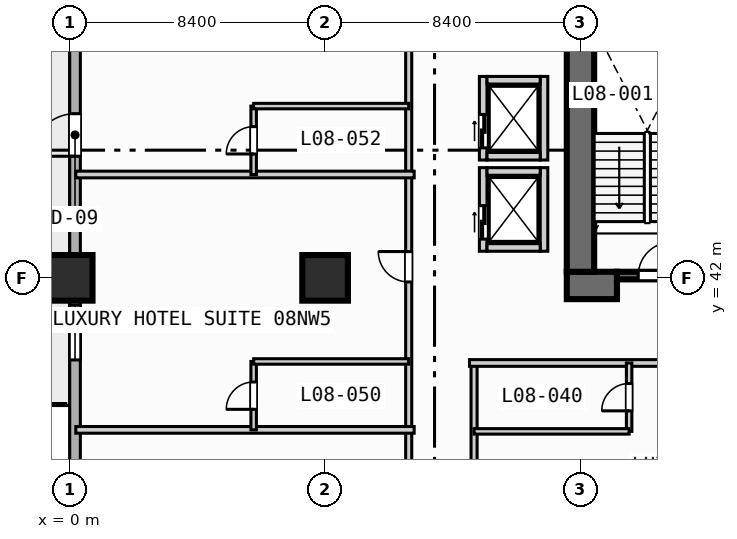
"""IFC4 building model, lengths in metres.
Left out: names, types, materials, properties, quantities, classifications, styles, units other than length and angle.
Written with IfcOpenShell. Run it as: python <this file> out.ifc"""

import sys

from ifc_helpers import new_model, si_unit, direction, frame, frame_2d, origin, origin_2d, place, context, subcontext, project, spatial, rectangle, extrude, element, fill, save


model = new_model("IFC4")
c1 = context("Model", 3, precision=1e-05, world=origin(), true_north=direction((0.0, 1.0)))
c2 = subcontext(c1, "Body", "Model", "MODEL_VIEW")
j1 = project(units=[si_unit("LENGTHUNIT", "METRE"), si_unit("PLANEANGLEUNIT", "RADIAN")], contexts=[c1])
p1 = place(None, origin())
s1 = spatial("IfcSite", under=j1, at=p1, CompositionType="ELEMENT")
p2 = place(p1, origin())
s2 = spatial("IfcBuilding", under=s1, at=p2, CompositionType="ELEMENT")
p3 = place(p2, frame((0.0, 0.0, 39.6)))
s3 = spatial("IfcBuildingStorey", under=s2, at=p3, CompositionType="ELEMENT", Elevation=39.6)
p4 = place(p3, frame((16.35, 41.75, 0.0), z_axis=(0.0, 0.0, 1.0), x_axis=(1.0, 0.0, 0.0)))
e1 = element("IfcWall", 1, at=p4, inside=s3, PredefinedType="SHEAR", context=c2, shape_type="SweptSolid", body=[
    extrude(rectangle(XDim=1.65, YDim=0.9, at=frame_2d((0.825, 0.0))), origin(), (0.0, 0.0, 1.0), 3.55),
])
p5 = place(p3, frame((16.8, 42.2, 0.0), z_axis=(0.0, 0.0, 1.0), x_axis=(0.0, 1.0, 0.0)))
e2 = element("IfcWall", 2, at=p5, inside=s3, PredefinedType="SHEAR", context=c2, shape_type="SweptSolid", body=[
    extrude(rectangle(XDim=16.35, YDim=0.9, at=frame_2d((8.175, 0.0))), origin(), (0.0, 0.0, 1.0), 3.55),
])
for number, where, z_axis, x_axis in (
    (3, (0.0, 42.0, 0.0), (0.0, 0.0, 1.0), (1.0, 0.0, 0.0)),
    (4, (8.4, 42.0, 0.0), (0.0, 0.0, 1.0), (1.0, 0.0, 0.0)),
):
    element("IfcColumn", number, at=place(p3, frame(where, z_axis=z_axis, x_axis=x_axis)), inside=s3, PredefinedType="COLUMN", context=c2, shape_type="SweptSolid", body=[
        extrude(rectangle(XDim=1.5, YDim=1.5, at=origin_2d()), origin(), (0.0, 0.0, 1.0), 3.8),
    ])
p6 = place(p3, frame((0.175, 3.175, 0.0), z_axis=(0.0, 0.0, 1.0), x_axis=(0.0, 1.0, 0.0)))
e5 = element("IfcWall", 5, at=p6, inside=s3, PredefinedType="STANDARD", context=c2, shape_type="SweptSolid", body=[
    extrude(rectangle(XDim=86.05, YDim=0.35, at=frame_2d((43.025, 0.0))), origin(), (0.0, 0.0, 1.0), 3.55),
])
p7 = place(p6, frame((42.825, 0.0, 0.0)))
e6 = element("IfcOpeningElement", 6, at=p7, cuts=e5, PredefinedType="OPENING", context=c2, shape_type="SweptSolid", body=[
    extrude(rectangle(XDim=1.4, YDim=2.2, at=frame_2d((0.7, 1.1))), frame((0.0, 0.185, 0.0), z_axis=(0.0, -1.0, 0.0), x_axis=(1.0, 0.0, 0.0)), (0.0, 0.0, 1.0), 0.37),
])
p8 = place(p6, frame((2.525, 0.0, 0.85)))
e7 = element("IfcOpeningElement", 7, at=p8, cuts=e5, PredefinedType="OPENING", context=c2, shape_type="SweptSolid", body=[
    extrude(rectangle(XDim=1.8, YDim=1.8, at=frame_2d((0.9, 0.9))), frame((0.0, 0.185, 0.0), z_axis=(0.0, -1.0, 0.0), x_axis=(1.0, 0.0, 0.0)), (0.0, 0.0, 1.0), 0.37),
])
p9 = place(p6, frame((10.925, 0.0, 0.85)))
e8 = element("IfcOpeningElement", 8, at=p9, cuts=e5, PredefinedType="OPENING", context=c2, shape_type="SweptSolid", body=[
    extrude(rectangle(XDim=1.8, YDim=1.8, at=frame_2d((0.9, 0.9))), frame((0.0, 0.185, 0.0), z_axis=(0.0, -1.0, 0.0), x_axis=(1.0, 0.0, 0.0)), (0.0, 0.0, 1.0), 0.37),
])
p10 = place(p6, frame((19.325, 0.0, 0.85)))
e9 = element("IfcOpeningElement", 9, at=p10, cuts=e5, PredefinedType="OPENING", context=c2, shape_type="SweptSolid", body=[
    extrude(rectangle(XDim=1.8, YDim=1.8, at=frame_2d((0.9, 0.9))), frame((0.0, 0.185, 0.0), z_axis=(0.0, -1.0, 0.0), x_axis=(1.0, 0.0, 0.0)), (0.0, 0.0, 1.0), 0.37),
])
p11 = place(p6, frame((27.725, 0.0, 0.85)))
e10 = element("IfcOpeningElement", 10, at=p11, cuts=e5, PredefinedType="OPENING", context=c2, shape_type="SweptSolid", body=[
    extrude(rectangle(XDim=1.8, YDim=1.8, at=frame_2d((0.9, 0.9))), frame((0.0, 0.185, 0.0), z_axis=(0.0, -1.0, 0.0), x_axis=(1.0, 0.0, 0.0)), (0.0, 0.0, 1.0), 0.37),
])
p12 = place(p6, frame((36.125, 0.0, 0.85)))
e11 = element("IfcOpeningElement", 11, at=p12, cuts=e5, PredefinedType="OPENING", context=c2, shape_type="SweptSolid", body=[
    extrude(rectangle(XDim=1.8, YDim=1.8, at=frame_2d((0.9, 0.9))), frame((0.0, 0.185, 0.0), z_axis=(0.0, -1.0, 0.0), x_axis=(1.0, 0.0, 0.0)), (0.0, 0.0, 1.0), 0.37),
])
p13 = place(p6, frame((52.925, 0.0, 0.85)))
e12 = element("IfcOpeningElement", 12, at=p13, cuts=e5, PredefinedType="OPENING", context=c2, shape_type="SweptSolid", body=[
    extrude(rectangle(XDim=1.8, YDim=1.8, at=frame_2d((0.9, 0.9))), frame((0.0, 0.185, 0.0), z_axis=(0.0, -1.0, 0.0), x_axis=(1.0, 0.0, 0.0)), (0.0, 0.0, 1.0), 0.37),
])
p14 = place(p6, frame((61.325, 0.0, 0.85)))
e13 = element("IfcOpeningElement", 13, at=p14, cuts=e5, PredefinedType="OPENING", context=c2, shape_type="SweptSolid", body=[
    extrude(rectangle(XDim=1.8, YDim=1.8, at=frame_2d((0.9, 0.9))), frame((0.0, 0.185, 0.0), z_axis=(0.0, -1.0, 0.0), x_axis=(1.0, 0.0, 0.0)), (0.0, 0.0, 1.0), 0.37),
])
p15 = place(p6, frame((69.725, 0.0, 0.85)))
e14 = element("IfcOpeningElement", 14, at=p15, cuts=e5, PredefinedType="OPENING", context=c2, shape_type="SweptSolid", body=[
    extrude(rectangle(XDim=1.8, YDim=1.8, at=frame_2d((0.9, 0.9))), frame((0.0, 0.185, 0.0), z_axis=(0.0, -1.0, 0.0), x_axis=(1.0, 0.0, 0.0)), (0.0, 0.0, 1.0), 0.37),
])
p16 = place(p6, frame((78.075, 0.0, 0.85)))
e15 = element("IfcOpeningElement", 15, at=p16, cuts=e5, PredefinedType="OPENING", context=c2, shape_type="SweptSolid", body=[
    extrude(rectangle(XDim=1.8, YDim=1.8, at=frame_2d((0.9, 0.9))), frame((0.0, 0.185, 0.0), z_axis=(0.0, -1.0, 0.0), x_axis=(1.0, 0.0, 0.0)), (0.0, 0.0, 1.0), 0.37),
])
p17 = place(p3, frame((18.0, 42.075, 0.0), z_axis=(0.0, 0.0, 1.0), x_axis=(1.0, 0.0, 0.0)))
e16 = element("IfcWall", 16, at=p17, inside=s3, PredefinedType="SOLIDWALL", context=c2, shape_type="SweptSolid", body=[
    extrude(rectangle(XDim=2.5, YDim=0.25, at=frame_2d((1.25, 0.0))), origin(), (0.0, 0.0, 1.0), 3.55),
])
p18 = place(p17, frame((0.7, 0.0, 0.0)))
e17 = element("IfcOpeningElement", 17, at=p18, cuts=e16, PredefinedType="OPENING", context=c2, shape_type="SweptSolid", body=[
    extrude(rectangle(XDim=1.1, YDim=2.15, at=frame_2d((0.55, 1.075))), frame((0.0, 0.135, 0.0), z_axis=(0.0, -1.0, 0.0), x_axis=(1.0, 0.0, 0.0)), (0.0, 0.0, 1.0), 0.27),
])
p19 = place(p3, frame((13.6, 42.875, 0.0), z_axis=(0.0, 0.0, 1.0), x_axis=(0.0, 1.0, 0.0)))
e18 = element("IfcWall", 18, at=p19, inside=s3, PredefinedType="SOLIDWALL", context=c2, shape_type="SweptSolid", body=[
    extrude(rectangle(XDim=2.75, YDim=0.25, at=frame_2d((1.375, 0.0))), origin(), (0.0, 0.0, 1.0), 3.55),
])
p20 = place(p19, frame((0.4, 0.0, 0.0)))
e19 = element("IfcOpeningElement", 19, at=p20, cuts=e18, PredefinedType="OPENING", context=c2, shape_type="SweptSolid", body=[
    extrude(rectangle(XDim=1.1, YDim=2.15, at=frame_2d((0.55, 1.075))), frame((0.0, 0.135, 0.0), z_axis=(0.0, -1.0, 0.0), x_axis=(1.0, 0.0, 0.0)), (0.0, 0.0, 1.0), 0.27),
])
p21 = place(p3, frame((15.6, 42.875, 0.0), z_axis=(0.0, 0.0, 1.0), x_axis=(0.0, 1.0, 0.0)))
e20 = element("IfcWall", 20, at=p21, inside=s3, PredefinedType="SOLIDWALL", context=c2, shape_type="SweptSolid", body=[
    extrude(rectangle(XDim=2.75, YDim=0.25, at=frame_2d((1.375, 0.0))), origin(), (0.0, 0.0, 1.0), 3.55),
])
for number, where, z_axis, x_axis in (
    (21, (13.725, 43.0, 0.0), (0.0, 0.0, 1.0), (1.0, 0.0, 0.0)),
    (22, (13.725, 45.5, 0.0), (0.0, 0.0, 1.0), (1.0, 0.0, 0.0)),
):
    element("IfcWall", number, at=place(p3, frame(where, z_axis=z_axis, x_axis=x_axis)), inside=s3, PredefinedType="SOLIDWALL", context=c2, shape_type="SweptSolid", body=[
        extrude(rectangle(XDim=1.75, YDim=0.25, at=frame_2d((0.875, 0.0))), origin(), (0.0, 0.0, 1.0), 3.55),
    ])
p22 = place(p3, frame((13.6, 45.875, 0.0), z_axis=(0.0, 0.0, 1.0), x_axis=(0.0, 1.0, 0.0)))
e23 = element("IfcWall", 23, at=p22, inside=s3, PredefinedType="SOLIDWALL", context=c2, shape_type="SweptSolid", body=[
    extrude(rectangle(XDim=2.75, YDim=0.25, at=frame_2d((1.375, 0.0))), origin(), (0.0, 0.0, 1.0), 3.55),
])
p23 = place(p22, frame((0.4, 0.0, 0.0)))
e24 = element("IfcOpeningElement", 24, at=p23, cuts=e23, PredefinedType="OPENING", context=c2, shape_type="SweptSolid", body=[
    extrude(rectangle(XDim=1.1, YDim=2.15, at=frame_2d((0.55, 1.075))), frame((0.0, 0.135, 0.0), z_axis=(0.0, -1.0, 0.0), x_axis=(1.0, 0.0, 0.0)), (0.0, 0.0, 1.0), 0.27),
])
p24 = place(p3, frame((15.6, 45.875, 0.0), z_axis=(0.0, 0.0, 1.0), x_axis=(0.0, 1.0, 0.0)))
e25 = element("IfcWall", 25, at=p24, inside=s3, PredefinedType="SOLIDWALL", context=c2, shape_type="SweptSolid", body=[
    extrude(rectangle(XDim=2.75, YDim=0.25, at=frame_2d((1.375, 0.0))), origin(), (0.0, 0.0, 1.0), 3.55),
])
for number, where, z_axis, x_axis in (
    (26, (13.725, 46.0, 0.0), (0.0, 0.0, 1.0), (1.0, 0.0, 0.0)),
    (27, (13.725, 48.5, 0.0), (0.0, 0.0, 1.0), (1.0, 0.0, 0.0)),
):
    element("IfcWall", number, at=place(p3, frame(where, z_axis=z_axis, x_axis=x_axis)), inside=s3, PredefinedType="SOLIDWALL", context=c2, shape_type="SweptSolid", body=[
        extrude(rectangle(XDim=1.75, YDim=0.25, at=frame_2d((0.875, 0.0))), origin(), (0.0, 0.0, 1.0), 3.55),
    ])
p25 = place(p3, frame((13.3, 25.6, 0.0), z_axis=(0.0, 0.0, 1.0), x_axis=(0.0, 1.0, 0.0)))
e28 = element("IfcWall", 28, at=p25, inside=s3, PredefinedType="PARTITIONING", context=c2, shape_type="SweptSolid", body=[
    extrude(rectangle(XDim=13.6, YDim=0.2, at=frame_2d((6.8, 0.0))), origin(), (0.0, 0.0, 1.0), 3.55),
])
p26 = place(p25, frame((1.735, 0.0, 0.0)))
e29 = element("IfcOpeningElement", 29, at=p26, cuts=e28, PredefinedType="OPENING", context=c2, shape_type="SweptSolid", body=[
    extrude(rectangle(XDim=1.0, YDim=2.15, at=frame_2d((0.5, 1.075))), frame((0.0, 0.11, 0.0), z_axis=(0.0, -1.0, 0.0), x_axis=(1.0, 0.0, 0.0)), (0.0, 0.0, 1.0), 0.22),
])
p27 = place(p25, frame((8.535, 0.0, 0.0)))
e30 = element("IfcOpeningElement", 30, at=p27, cuts=e28, PredefinedType="OPENING", context=c2, shape_type="SweptSolid", body=[
    extrude(rectangle(XDim=1.0, YDim=2.15, at=frame_2d((0.5, 1.075))), frame((0.0, 0.11, 0.0), z_axis=(0.0, -1.0, 0.0), x_axis=(1.0, 0.0, 0.0)), (0.0, 0.0, 1.0), 0.22),
])
p28 = place(p3, frame((13.15, 39.2, 0.0), z_axis=(0.0, 0.0, 1.0), x_axis=(1.0, 0.0, 0.0)))
e31 = element("IfcWall", 31, at=p28, inside=s3, PredefinedType="PARTITIONING", context=c2, shape_type="SweptSolid", body=[
    extrude(rectangle(XDim=20.28, YDim=0.22, at=frame_2d((10.14, 0.0))), origin(), (0.0, 0.0, 1.0), 3.55),
])
p29 = place(p3, frame((18.4, 36.95, 0.0), z_axis=(0.0, 0.0, 1.0), x_axis=(0.0, 1.0, 0.0)))
e32 = element("IfcWall", 32, at=p29, inside=s3, PredefinedType="PLUMBINGWALL", context=c2, shape_type="SweptSolid", body=[
    extrude(rectangle(XDim=2.25, YDim=0.18, at=frame_2d((1.125, 0.0))), origin(), (0.0, 0.0, 1.0), 3.55),
])
p30 = place(p29, frame((0.675, 0.0, 0.0)))
e33 = element("IfcOpeningElement", 33, at=p30, cuts=e32, PredefinedType="OPENING", context=c2, shape_type="SweptSolid", body=[
    extrude(rectangle(XDim=0.9, YDim=2.1, at=frame_2d((0.45, 1.05))), frame((0.0, 0.1, 0.0), z_axis=(0.0, -1.0, 0.0), x_axis=(1.0, 0.0, 0.0)), (0.0, 0.0, 1.0), 0.2),
])
p31 = place(p3, frame((13.3, 36.95, 0.0), z_axis=(0.0, 0.0, 1.0), x_axis=(1.0, 0.0, 0.0)))
e34 = element("IfcWall", 34, at=p31, inside=s3, PredefinedType="PLUMBINGWALL", context=c2, shape_type="SweptSolid", body=[
    extrude(rectangle(XDim=5.1, YDim=0.18, at=frame_2d((2.55, 0.0))), origin(), (0.0, 0.0, 1.0), 3.55),
])
p32 = place(p3, frame((11.15, 3.4, 0.0), z_axis=(0.0, 0.0, 1.0), x_axis=(0.0, 1.0, 0.0)))
e35 = element("IfcWall", 35, at=p32, inside=s3, PredefinedType="PARTITIONING", context=c2, shape_type="SweptSolid", body=[
    extrude(rectangle(XDim=85.4, YDim=0.2, at=frame_2d((42.7, 0.0))), origin(), (0.0, 0.0, 1.0), 3.55),
])
p33 = place(p32, frame((4.865, 0.0, 0.0)))
e36 = element("IfcOpeningElement", 36, at=p33, cuts=e35, PredefinedType="OPENING", context=c2, shape_type="SweptSolid", body=[
    extrude(rectangle(XDim=1.0, YDim=2.15, at=frame_2d((0.5, 1.075))), frame((0.0, 0.11, 0.0), z_axis=(0.0, -1.0, 0.0), x_axis=(1.0, 0.0, 0.0)), (0.0, 0.0, 1.0), 0.22),
])
p34 = place(p32, frame((13.265, 0.0, 0.0)))
e37 = element("IfcOpeningElement", 37, at=p34, cuts=e35, PredefinedType="OPENING", context=c2, shape_type="SweptSolid", body=[
    extrude(rectangle(XDim=1.0, YDim=2.15, at=frame_2d((0.5, 1.075))), frame((0.0, 0.11, 0.0), z_axis=(0.0, -1.0, 0.0), x_axis=(1.0, 0.0, 0.0)), (0.0, 0.0, 1.0), 0.22),
])
p35 = place(p32, frame((21.665, 0.0, 0.0)))
e38 = element("IfcOpeningElement", 38, at=p35, cuts=e35, PredefinedType="OPENING", context=c2, shape_type="SweptSolid", body=[
    extrude(rectangle(XDim=1.0, YDim=2.15, at=frame_2d((0.5, 1.075))), frame((0.0, 0.11, 0.0), z_axis=(0.0, -1.0, 0.0), x_axis=(1.0, 0.0, 0.0)), (0.0, 0.0, 1.0), 0.22),
])
p36 = place(p32, frame((30.065, 0.0, 0.0)))
e39 = element("IfcOpeningElement", 39, at=p36, cuts=e35, PredefinedType="OPENING", context=c2, shape_type="SweptSolid", body=[
    extrude(rectangle(XDim=1.0, YDim=2.15, at=frame_2d((0.5, 1.075))), frame((0.0, 0.11, 0.0), z_axis=(0.0, -1.0, 0.0), x_axis=(1.0, 0.0, 0.0)), (0.0, 0.0, 1.0), 0.22),
])
p37 = place(p32, frame((38.465, 0.0, 0.0)))
e40 = element("IfcOpeningElement", 40, at=p37, cuts=e35, PredefinedType="OPENING", context=c2, shape_type="SweptSolid", body=[
    extrude(rectangle(XDim=1.0, YDim=2.15, at=frame_2d((0.5, 1.075))), frame((0.0, 0.11, 0.0), z_axis=(0.0, -1.0, 0.0), x_axis=(1.0, 0.0, 0.0)), (0.0, 0.0, 1.0), 0.22),
])
p38 = place(p32, frame((46.865, 0.0, 0.0)))
e41 = element("IfcOpeningElement", 41, at=p38, cuts=e35, PredefinedType="OPENING", context=c2, shape_type="SweptSolid", body=[
    extrude(rectangle(XDim=1.0, YDim=2.15, at=frame_2d((0.5, 1.075))), frame((0.0, 0.11, 0.0), z_axis=(0.0, -1.0, 0.0), x_axis=(1.0, 0.0, 0.0)), (0.0, 0.0, 1.0), 0.22),
])
p39 = place(p32, frame((55.265, 0.0, 0.0)))
e42 = element("IfcOpeningElement", 42, at=p39, cuts=e35, PredefinedType="OPENING", context=c2, shape_type="SweptSolid", body=[
    extrude(rectangle(XDim=1.0, YDim=2.15, at=frame_2d((0.5, 1.075))), frame((0.0, 0.11, 0.0), z_axis=(0.0, -1.0, 0.0), x_axis=(1.0, 0.0, 0.0)), (0.0, 0.0, 1.0), 0.22),
])
p40 = place(p32, frame((63.665, 0.0, 0.0)))
e43 = element("IfcOpeningElement", 43, at=p40, cuts=e35, PredefinedType="OPENING", context=c2, shape_type="SweptSolid", body=[
    extrude(rectangle(XDim=1.0, YDim=2.15, at=frame_2d((0.5, 1.075))), frame((0.0, 0.11, 0.0), z_axis=(0.0, -1.0, 0.0), x_axis=(1.0, 0.0, 0.0)), (0.0, 0.0, 1.0), 0.22),
])
p41 = place(p32, frame((72.065, 0.0, 0.0)))
e44 = element("IfcOpeningElement", 44, at=p41, cuts=e35, PredefinedType="OPENING", context=c2, shape_type="SweptSolid", body=[
    extrude(rectangle(XDim=1.0, YDim=2.15, at=frame_2d((0.5, 1.075))), frame((0.0, 0.11, 0.0), z_axis=(0.0, -1.0, 0.0), x_axis=(1.0, 0.0, 0.0)), (0.0, 0.0, 1.0), 0.22),
])
p42 = place(p32, frame((81.165, 0.0, 0.0)))
e45 = element("IfcOpeningElement", 45, at=p42, cuts=e35, PredefinedType="OPENING", context=c2, shape_type="SweptSolid", body=[
    extrude(rectangle(XDim=1.0, YDim=2.15, at=frame_2d((0.5, 1.075))), frame((0.0, 0.11, 0.0), z_axis=(0.0, -1.0, 0.0), x_axis=(1.0, 0.0, 0.0)), (0.0, 0.0, 1.0), 0.22),
])
p43 = place(p3, frame((0.2, 37.0, 0.0), z_axis=(0.0, 0.0, 1.0), x_axis=(1.0, 0.0, 0.0)))
e46 = element("IfcWall", 46, at=p43, inside=s3, PredefinedType="PARTITIONING", context=c2, shape_type="SweptSolid", body=[
    extrude(rectangle(XDim=11.13, YDim=0.22, at=frame_2d((5.565, 0.0))), origin(), (0.0, 0.0, 1.0), 3.55),
])
p44 = place(p3, frame((6.05, 37.0, 0.0), z_axis=(0.0, 0.0, 1.0), x_axis=(0.0, 1.0, 0.0)))
e47 = element("IfcWall", 47, at=p44, inside=s3, PredefinedType="PLUMBINGWALL", context=c2, shape_type="SweptSolid", body=[
    extrude(rectangle(XDim=2.25, YDim=0.18, at=frame_2d((1.125, 0.0))), origin(), (0.0, 0.0, 1.0), 3.55),
])
p45 = place(p44, frame((0.675, 0.0, 0.0)))
e48 = element("IfcOpeningElement", 48, at=p45, cuts=e47, PredefinedType="OPENING", context=c2, shape_type="SweptSolid", body=[
    extrude(rectangle(XDim=0.9, YDim=2.1, at=frame_2d((0.45, 1.05))), frame((0.0, 0.1, 0.0), z_axis=(0.0, -1.0, 0.0), x_axis=(1.0, 0.0, 0.0)), (0.0, 0.0, 1.0), 0.2),
])
p46 = place(p3, frame((6.05, 39.25, 0.0), z_axis=(0.0, 0.0, 1.0), x_axis=(1.0, 0.0, 0.0)))
e49 = element("IfcWall", 49, at=p46, inside=s3, PredefinedType="PLUMBINGWALL", context=c2, shape_type="SweptSolid", body=[
    extrude(rectangle(XDim=5.1, YDim=0.18, at=frame_2d((2.55, 0.0))), origin(), (0.0, 0.0, 1.0), 3.55),
])
p47 = place(p3, frame((0.2, 45.4, 0.0), z_axis=(0.0, 0.0, 1.0), x_axis=(1.0, 0.0, 0.0)))
e50 = element("IfcWall", 50, at=p47, inside=s3, PredefinedType="PARTITIONING", context=c2, shape_type="SweptSolid", body=[
    extrude(rectangle(XDim=11.13, YDim=0.22, at=frame_2d((5.565, 0.0))), origin(), (0.0, 0.0, 1.0), 3.55),
])
p48 = place(p3, frame((6.05, 45.4, 0.0), z_axis=(0.0, 0.0, 1.0), x_axis=(0.0, 1.0, 0.0)))
e51 = element("IfcWall", 51, at=p48, inside=s3, PredefinedType="PLUMBINGWALL", context=c2, shape_type="SweptSolid", body=[
    extrude(rectangle(XDim=2.25, YDim=0.18, at=frame_2d((1.125, 0.0))), origin(), (0.0, 0.0, 1.0), 3.55),
])
p49 = place(p48, frame((0.675, 0.0, 0.0)))
e52 = element("IfcOpeningElement", 52, at=p49, cuts=e51, PredefinedType="OPENING", context=c2, shape_type="SweptSolid", body=[
    extrude(rectangle(XDim=0.9, YDim=2.1, at=frame_2d((0.45, 1.05))), frame((0.0, 0.1, 0.0), z_axis=(0.0, -1.0, 0.0), x_axis=(1.0, 0.0, 0.0)), (0.0, 0.0, 1.0), 0.2),
])
p50 = place(p3, frame((6.05, 47.65, 0.0), z_axis=(0.0, 0.0, 1.0), x_axis=(1.0, 0.0, 0.0)))
e53 = element("IfcWall", 53, at=p50, inside=s3, PredefinedType="PLUMBINGWALL", context=c2, shape_type="SweptSolid", body=[
    extrude(rectangle(XDim=5.1, YDim=0.18, at=frame_2d((2.55, 0.0))), origin(), (0.0, 0.0, 1.0), 3.55),
])
p51 = place(p7, origin())
e54 = element("IfcDoor", 54, at=p51, inside=s3, OperationType="SINGLE_SWING_LEFT", PredefinedType="DOOR", context=c2, shape_type="SweptSolid", body=[
    extrude(rectangle(XDim=1.4, YDim=2.2, at=frame_2d((0.7, 1.1))), frame((0.0, 0.025, 0.0), z_axis=(0.0, -1.0, 0.0), x_axis=(1.0, 0.0, 0.0)), (0.0, 0.0, 1.0), 0.05),
])
fill(e6, e54)
p52 = place(p12, origin())
e55 = element("IfcWindow", 55, at=p52, inside=s3, PartitioningType="SINGLE_PANEL", PredefinedType="WINDOW", context=c2, shape_type="SweptSolid", body=[
    extrude(rectangle(XDim=1.8, YDim=1.8, at=frame_2d((0.9, 0.9))), frame((0.0, 0.03, 0.0), z_axis=(0.0, -1.0, 0.0), x_axis=(1.0, 0.0, 0.0)), (0.0, 0.0, 1.0), 0.06),
])
fill(e11, e55)
p53 = place(p18, origin())
e56 = element("IfcDoor", 56, at=p53, inside=s3, OperationType="SINGLE_SWING_RIGHT", PredefinedType="DOOR", context=c2, shape_type="SweptSolid", body=[
    extrude(rectangle(XDim=1.1, YDim=2.15, at=frame_2d((0.55, 1.075))), frame((0.0, 0.025, 0.0), z_axis=(0.0, -1.0, 0.0), x_axis=(1.0, 0.0, 0.0)), (0.0, 0.0, 1.0), 0.05),
])
fill(e17, e56)
p54 = place(p20, origin())
e57 = element("IfcDoor", 57, at=p54, inside=s3, OperationType="SLIDING_TO_LEFT", PredefinedType="DOOR", context=c2, shape_type="SweptSolid", body=[
    extrude(rectangle(XDim=1.1, YDim=2.15, at=frame_2d((0.55, 1.075))), frame((0.0, 0.025, 0.0), z_axis=(0.0, -1.0, 0.0), x_axis=(1.0, 0.0, 0.0)), (0.0, 0.0, 1.0), 0.05),
])
fill(e19, e57)
p55 = place(p23, origin())
e58 = element("IfcDoor", 58, at=p55, inside=s3, OperationType="SLIDING_TO_LEFT", PredefinedType="DOOR", context=c2, shape_type="SweptSolid", body=[
    extrude(rectangle(XDim=1.1, YDim=2.15, at=frame_2d((0.55, 1.075))), frame((0.0, 0.025, 0.0), z_axis=(0.0, -1.0, 0.0), x_axis=(1.0, 0.0, 0.0)), (0.0, 0.0, 1.0), 0.05),
])
fill(e24, e58)
p56 = place(p30, origin())
e59 = element("IfcDoor", 59, at=p56, inside=s3, OperationType="SINGLE_SWING_LEFT", PredefinedType="DOOR", context=c2, shape_type="SweptSolid", body=[
    extrude(rectangle(XDim=0.9, YDim=2.1, at=frame_2d((0.45, 1.05))), frame((0.0, 0.025, 0.0), z_axis=(0.0, -1.0, 0.0), x_axis=(1.0, 0.0, 0.0)), (0.0, 0.0, 1.0), 0.05),
])
fill(e33, e59)
p57 = place(p37, origin())
e60 = element("IfcDoor", 60, at=p57, inside=s3, OperationType="SINGLE_SWING_RIGHT", PredefinedType="DOOR", context=c2, shape_type="SweptSolid", body=[
    extrude(rectangle(XDim=1.0, YDim=2.15, at=frame_2d((0.5, 1.075))), frame((0.0, 0.025, 0.0), z_axis=(0.0, -1.0, 0.0), x_axis=(1.0, 0.0, 0.0)), (0.0, 0.0, 1.0), 0.05),
])
fill(e40, e60)
p58 = place(p45, origin())
e61 = element("IfcDoor", 61, at=p58, inside=s3, OperationType="SINGLE_SWING_LEFT", PredefinedType="DOOR", context=c2, shape_type="SweptSolid", body=[
    extrude(rectangle(XDim=0.9, YDim=2.1, at=frame_2d((0.45, 1.05))), frame((0.0, 0.025, 0.0), z_axis=(0.0, -1.0, 0.0), x_axis=(1.0, 0.0, 0.0)), (0.0, 0.0, 1.0), 0.05),
])
fill(e48, e61)
p59 = place(p49, origin())
e62 = element("IfcDoor", 62, at=p59, inside=s3, OperationType="SINGLE_SWING_LEFT", PredefinedType="DOOR", context=c2, shape_type="SweptSolid", body=[
    extrude(rectangle(XDim=0.9, YDim=2.1, at=frame_2d((0.45, 1.05))), frame((0.0, 0.025, 0.0), z_axis=(0.0, -1.0, 0.0), x_axis=(1.0, 0.0, 0.0)), (0.0, 0.0, 1.0), 0.05),
])
fill(e52, e62)
save(model, sys.argv[1])
